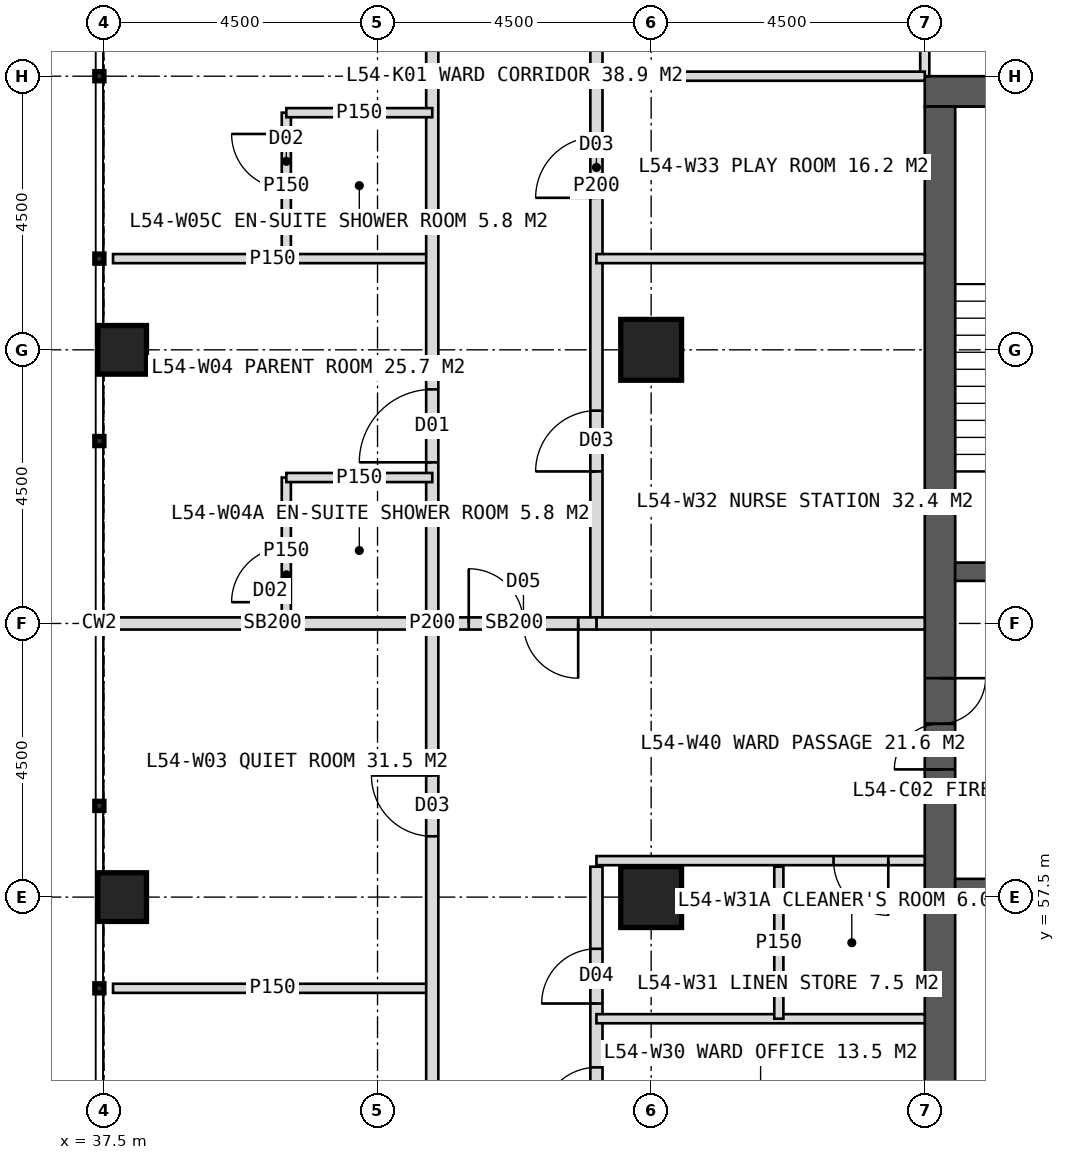
"""IFC4 building model, lengths in metres.
Left out: names, types, materials, properties, quantities, classifications, styles, units other than length and angle.
Written with IfcOpenShell. Run it as: python <this file> out.ifc"""

import sys

from ifc_helpers import new_model, si_unit, direction, frame, frame_2d, origin, origin_2d, place, context, subcontext, project, spatial, rectangle, hollow_rectangle, extrude, element, fill, save


model = new_model("IFC4")
c1 = context("Model", 3, precision=1e-05, world=origin(), true_north=direction((0.0, 1.0)))
c2 = subcontext(c1, "Body", "Model", "MODEL_VIEW")
j1 = project(units=[si_unit("LENGTHUNIT", "METRE"), si_unit("PLANEANGLEUNIT", "RADIAN")], contexts=[c1])
p1 = place(None, origin())
s1 = spatial("IfcSite", under=j1, at=p1, CompositionType="ELEMENT")
p2 = place(p1, origin())
s2 = spatial("IfcBuilding", under=s1, at=p2, CompositionType="ELEMENT")
p3 = place(p2, frame((0.0, 0.0, 225.0)))
s3 = spatial("IfcBuildingStorey", under=s2, at=p3, CompositionType="ELEMENT", Elevation=225.0)
p4 = place(p3, frame((51.0, 70.75, 0.0), z_axis=(0.0, 0.0, 1.0), x_axis=(1.0, 0.0, 0.0)))
e1 = element("IfcWall", 1, at=p4, inside=s3, PredefinedType="SHEAR", context=c2, shape_type="SweptSolid", body=[
    extrude(rectangle(XDim=18.0, YDim=0.5, at=frame_2d((9.0, 0.0))), origin(), (0.0, 0.0, 1.0), 4.0),
])
p5 = place(p4, frame((8.1, 0.0, 0.0)))
e2 = element("IfcOpeningElement", 2, at=p5, cuts=e1, PredefinedType="OPENING", context=c2, shape_type="SweptSolid", body=[
    extrude(rectangle(XDim=1.8, YDim=2.2, at=frame_2d((0.9, 1.1))), frame((0.0, 0.26, 0.0), z_axis=(0.0, -1.0, 0.0), x_axis=(1.0, 0.0, 0.0)), (0.0, 0.0, 1.0), 0.52),
])
p6 = place(p3, frame((51.25, 53.5, 0.0), z_axis=(0.0, 0.0, 1.0), x_axis=(0.0, 1.0, 0.0)))
e3 = element("IfcWall", 3, at=p6, inside=s3, PredefinedType="SHEAR", context=c2, shape_type="SweptSolid", body=[
    extrude(rectangle(XDim=17.0, YDim=0.5, at=frame_2d((8.5, 0.0))), origin(), (0.0, 0.0, 1.0), 4.0),
])
p7 = place(p6, frame((6.1, 0.0, 0.0)))
e4 = element("IfcOpeningElement", 4, at=p7, cuts=e3, PredefinedType="OPENING", context=c2, shape_type="SweptSolid", body=[
    extrude(rectangle(XDim=1.5, YDim=2.2, at=frame_2d((0.75, 1.1))), frame((0.0, 0.26, 0.0), z_axis=(0.0, -1.0, 0.0), x_axis=(1.0, 0.0, 0.0)), (0.0, 0.0, 1.0), 0.52),
])
p8 = place(p3, frame((51.5, 62.85, 0.0), z_axis=(0.0, 0.0, 1.0), x_axis=(1.0, 0.0, 0.0)))
e5 = element("IfcWall", 5, at=p8, inside=s3, PredefinedType="SHEAR", context=c2, shape_type="SweptSolid", body=[
    extrude(rectangle(XDim=3.3, YDim=0.3, at=frame_2d((1.65, 0.0))), origin(), (0.0, 0.0, 1.0), 4.0),
])
p9 = place(p8, frame((1.15, 0.0, 0.0)))
e6 = element("IfcOpeningElement", 6, at=p9, cuts=e5, PredefinedType="OPENING", context=c2, shape_type="SweptSolid", body=[
    extrude(rectangle(XDim=1.2, YDim=2.1, at=frame_2d((0.6, 1.05))), frame((0.0, 0.16, 0.0), z_axis=(0.0, -1.0, 0.0), x_axis=(1.0, 0.0, 0.0)), (0.0, 0.0, 1.0), 0.32),
])
p10 = place(p3, frame((51.5, 57.65, 0.0), z_axis=(0.0, 0.0, 1.0), x_axis=(1.0, 0.0, 0.0)))
e7 = element("IfcWall", 7, at=p10, inside=s3, PredefinedType="SHEAR", context=c2, shape_type="SweptSolid", body=[
    extrude(rectangle(XDim=3.3, YDim=0.3, at=frame_2d((1.65, 0.0))), origin(), (0.0, 0.0, 1.0), 4.0),
])
p11 = place(p10, frame((1.15, 0.0, 0.0)))
e8 = element("IfcOpeningElement", 8, at=p11, cuts=e7, PredefinedType="OPENING", context=c2, shape_type="SweptSolid", body=[
    extrude(rectangle(XDim=1.2, YDim=2.2, at=frame_2d((0.6, 1.1))), frame((0.0, 0.16, 0.0), z_axis=(0.0, -1.0, 0.0), x_axis=(1.0, 0.0, 0.0)), (0.0, 0.0, 1.0), 0.32),
])
for number, where, z_axis, x_axis in (
    (9, (46.5, 57.5, 0.0), (0.0, 0.0, 1.0), (1.0, 0.0, 0.0)),
    (10, (46.5, 66.5, 0.0), (0.0, 0.0, 1.0), (1.0, 0.0, 0.0)),
):
    element("IfcColumn", number, at=place(p3, frame(where, z_axis=z_axis, x_axis=x_axis)), inside=s3, PredefinedType="COLUMN", context=c2, shape_type="SweptSolid", body=[
        extrude(hollow_rectangle(XDim=1.0, YDim=1.0, WallThickness=0.1, at=origin_2d()), origin(), (0.0, 0.0, 1.0), 4.0),
    ])
for number, where, z_axis, x_axis in (
    (11, (37.8, 57.5, 0.0), (0.0, 0.0, 1.0), (1.0, 0.0, 0.0)),
    (12, (37.8, 66.5, 0.0), (0.0, 0.0, 1.0), (1.0, 0.0, 0.0)),
):
    element("IfcColumn", number, at=place(p3, frame(where, z_axis=z_axis, x_axis=x_axis)), inside=s3, PredefinedType="COLUMN", context=c2, shape_type="SweptSolid", body=[
        extrude(hollow_rectangle(XDim=0.8, YDim=0.8, WallThickness=0.08, at=origin_2d()), origin(), (0.0, 0.0, 1.0), 4.0),
    ])
p12 = place(p3, frame((51.0, 71.0, 0.0), z_axis=(0.0, 0.0, 1.0), x_axis=(0.0, 1.0, 0.0)))
e13 = element("IfcWall", 13, at=p12, inside=s3, PredefinedType="PARTITIONING", context=c2, shape_type="SweptSolid", body=[
    extrude(rectangle(XDim=5.4, YDim=0.15, at=frame_2d((2.7, 0.0))), origin(), (0.0, 0.0, 1.0), 3.75),
])
p13 = place(p3, frame((42.9, 56.0, 0.0), z_axis=(0.0, 0.0, 1.0), x_axis=(-1.0, 0.0, 0.0)))
e14 = element("IfcWall", 14, at=p13, inside=s3, PredefinedType="PARTITIONING", context=c2, shape_type="SweptSolid", body=[
    extrude(rectangle(XDim=5.25, YDim=0.15, at=frame_2d((2.625, 0.0))), origin(), (0.0, 0.0, 1.0), 3.75),
])
p14 = place(p3, frame((42.9, 62.0, 0.0), z_axis=(0.0, 0.0, 1.0), x_axis=(-1.0, 0.0, 0.0)))
e15 = element("IfcWall", 15, at=p14, inside=s3, PredefinedType="SOLIDWALL", context=c2, shape_type="SweptSolid", body=[
    extrude(rectangle(XDim=5.25, YDim=0.2, at=frame_2d((2.625, 0.0))), origin(), (0.0, 0.0, 1.0), 2.95),
])
p15 = place(p3, frame((42.9, 68.0, 0.0), z_axis=(0.0, 0.0, 1.0), x_axis=(-1.0, 0.0, 0.0)))
e16 = element("IfcWall", 16, at=p15, inside=s3, PredefinedType="PARTITIONING", context=c2, shape_type="SweptSolid", body=[
    extrude(rectangle(XDim=5.25, YDim=0.15, at=frame_2d((2.625, 0.0))), origin(), (0.0, 0.0, 1.0), 3.75),
])
p16 = place(p3, frame((42.9, 44.9, 0.0), z_axis=(0.0, 0.0, 1.0), x_axis=(0.0, 1.0, 0.0)))
e17 = element("IfcWall", 17, at=p16, inside=s3, PredefinedType="PARTITIONING", context=c2, shape_type="SweptSolid", body=[
    extrude(rectangle(XDim=34.2, YDim=0.2, at=frame_2d((17.1, 0.0))), origin(), (0.0, 0.0, 1.0), 3.75),
])
p17 = place(p16, frame((1.25, 0.0, 0.0)))
e18 = element("IfcOpeningElement", 18, at=p17, cuts=e17, PredefinedType="OPENING", context=c2, shape_type="SweptSolid", body=[
    extrude(rectangle(XDim=1.2, YDim=2.2, at=frame_2d((0.6, 1.1))), frame((0.0, 0.11, 0.0), z_axis=(0.0, -1.0, 0.0), x_axis=(1.0, 0.0, 0.0)), (0.0, 0.0, 1.0), 0.22),
])
p18 = place(p16, frame((7.75, 0.0, 0.0)))
e19 = element("IfcOpeningElement", 19, at=p18, cuts=e17, PredefinedType="OPENING", context=c2, shape_type="SweptSolid", body=[
    extrude(rectangle(XDim=1.2, YDim=2.2, at=frame_2d((0.6, 1.1))), frame((0.0, 0.11, 0.0), z_axis=(0.0, -1.0, 0.0), x_axis=(1.0, 0.0, 0.0)), (0.0, 0.0, 1.0), 0.22),
])
p19 = place(p16, frame((13.6, 0.0, 0.0)))
e20 = element("IfcOpeningElement", 20, at=p19, cuts=e17, PredefinedType="OPENING", context=c2, shape_type="SweptSolid", body=[
    extrude(rectangle(XDim=1.0, YDim=2.1, at=frame_2d((0.5, 1.05))), frame((0.0, 0.11, 0.0), z_axis=(0.0, -1.0, 0.0), x_axis=(1.0, 0.0, 0.0)), (0.0, 0.0, 1.0), 0.22),
])
p20 = place(p16, frame((19.75, 0.0, 0.0)))
e21 = element("IfcOpeningElement", 21, at=p20, cuts=e17, PredefinedType="OPENING", context=c2, shape_type="SweptSolid", body=[
    extrude(rectangle(XDim=1.2, YDim=2.2, at=frame_2d((0.6, 1.1))), frame((0.0, 0.11, 0.0), z_axis=(0.0, -1.0, 0.0), x_axis=(1.0, 0.0, 0.0)), (0.0, 0.0, 1.0), 0.22),
])
p21 = place(p16, frame((30.35, 0.0, 0.0)))
e22 = element("IfcOpeningElement", 22, at=p21, cuts=e17, PredefinedType="OPENING", context=c2, shape_type="SweptSolid", body=[
    extrude(rectangle(XDim=1.2, YDim=2.2, at=frame_2d((0.6, 1.1))), frame((0.0, 0.11, 0.0), z_axis=(0.0, -1.0, 0.0), x_axis=(1.0, 0.0, 0.0)), (0.0, 0.0, 1.0), 0.22),
])
p22 = place(p3, frame((40.5, 62.0, 0.0), z_axis=(0.0, 0.0, 1.0), x_axis=(0.0, 1.0, 0.0)))
e23 = element("IfcWall", 23, at=p22, inside=s3, PredefinedType="PARTITIONING", context=c2, shape_type="SweptSolid", body=[
    extrude(rectangle(XDim=2.4, YDim=0.15, at=frame_2d((1.2, 0.0))), origin(), (0.0, 0.0, 1.0), 3.75),
])
p23 = place(p22, frame((0.35, 0.0, 0.0)))
e24 = element("IfcOpeningElement", 24, at=p23, cuts=e23, PredefinedType="OPENING", context=c2, shape_type="SweptSolid", body=[
    extrude(rectangle(XDim=0.9, YDim=2.1, at=frame_2d((0.45, 1.05))), frame((0.0, 0.085, 0.0), z_axis=(0.0, -1.0, 0.0), x_axis=(1.0, 0.0, 0.0)), (0.0, 0.0, 1.0), 0.17),
])
p24 = place(p3, frame((42.9, 64.4, 0.0), z_axis=(0.0, 0.0, 1.0), x_axis=(-1.0, 0.0, 0.0)))
e25 = element("IfcWall", 25, at=p24, inside=s3, PredefinedType="PARTITIONING", context=c2, shape_type="SweptSolid", body=[
    extrude(rectangle(XDim=2.4, YDim=0.15, at=frame_2d((1.2, 0.0))), origin(), (0.0, 0.0, 1.0), 3.75),
])
p25 = place(p3, frame((40.5, 68.0, 0.0), z_axis=(0.0, 0.0, 1.0), x_axis=(0.0, 1.0, 0.0)))
e26 = element("IfcWall", 26, at=p25, inside=s3, PredefinedType="PARTITIONING", context=c2, shape_type="SweptSolid", body=[
    extrude(rectangle(XDim=2.4, YDim=0.15, at=frame_2d((1.2, 0.0))), origin(), (0.0, 0.0, 1.0), 3.75),
])
p26 = place(p25, frame((1.15, 0.0, 0.0)))
e27 = element("IfcOpeningElement", 27, at=p26, cuts=e26, PredefinedType="OPENING", context=c2, shape_type="SweptSolid", body=[
    extrude(rectangle(XDim=0.9, YDim=2.1, at=frame_2d((0.45, 1.05))), frame((0.0, 0.085, 0.0), z_axis=(0.0, -1.0, 0.0), x_axis=(1.0, 0.0, 0.0)), (0.0, 0.0, 1.0), 0.17),
])
p27 = place(p3, frame((42.9, 70.4, 0.0), z_axis=(0.0, 0.0, 1.0), x_axis=(-1.0, 0.0, 0.0)))
e28 = element("IfcWall", 28, at=p27, inside=s3, PredefinedType="PARTITIONING", context=c2, shape_type="SweptSolid", body=[
    extrude(rectangle(XDim=2.4, YDim=0.15, at=frame_2d((1.2, 0.0))), origin(), (0.0, 0.0, 1.0), 3.75),
])
p28 = place(p3, frame((45.6, 49.1, 0.0), z_axis=(0.0, 0.0, 1.0), x_axis=(0.0, 1.0, 0.0)))
e29 = element("IfcWall", 29, at=p28, inside=s3, PredefinedType="PARTITIONING", context=c2, shape_type="SweptSolid", body=[
    extrude(rectangle(XDim=8.9, YDim=0.2, at=frame_2d((4.45, 0.0))), origin(), (0.0, 0.0, 1.0), 3.75),
])
p29 = place(p28, frame((4.7, 0.0, 0.0)))
e30 = element("IfcOpeningElement", 30, at=p29, cuts=e29, PredefinedType="OPENING", context=c2, shape_type="SweptSolid", body=[
    extrude(rectangle(XDim=0.9, YDim=2.1, at=frame_2d((0.45, 1.05))), frame((0.0, 0.11, 0.0), z_axis=(0.0, -1.0, 0.0), x_axis=(1.0, 0.0, 0.0)), (0.0, 0.0, 1.0), 0.22),
])
p30 = place(p28, frame((6.65, 0.0, 0.0)))
e31 = element("IfcOpeningElement", 31, at=p30, cuts=e29, PredefinedType="OPENING", context=c2, shape_type="SweptSolid", body=[
    extrude(rectangle(XDim=0.9, YDim=2.1, at=frame_2d((0.45, 1.05))), frame((0.0, 0.11, 0.0), z_axis=(0.0, -1.0, 0.0), x_axis=(1.0, 0.0, 0.0)), (0.0, 0.0, 1.0), 0.22),
])
p31 = place(p3, frame((45.6, 62.0, 0.0), z_axis=(0.0, 0.0, 1.0), x_axis=(0.0, 1.0, 0.0)))
e32 = element("IfcWall", 32, at=p31, inside=s3, PredefinedType="PARTITIONING", context=c2, shape_type="SweptSolid", body=[
    extrude(rectangle(XDim=14.4, YDim=0.2, at=frame_2d((7.2, 0.0))), origin(), (0.0, 0.0, 1.0), 3.75),
])
p32 = place(p31, frame((2.5, 0.0, 0.0)))
e33 = element("IfcOpeningElement", 33, at=p32, cuts=e32, PredefinedType="OPENING", context=c2, shape_type="SweptSolid", body=[
    extrude(rectangle(XDim=1.0, YDim=2.1, at=frame_2d((0.5, 1.05))), frame((0.0, 0.11, 0.0), z_axis=(0.0, -1.0, 0.0), x_axis=(1.0, 0.0, 0.0)), (0.0, 0.0, 1.0), 0.22),
])
p33 = place(p31, frame((7.0, 0.0, 0.0)))
e34 = element("IfcOpeningElement", 34, at=p33, cuts=e32, PredefinedType="OPENING", context=c2, shape_type="SweptSolid", body=[
    extrude(rectangle(XDim=1.0, YDim=2.1, at=frame_2d((0.5, 1.05))), frame((0.0, 0.11, 0.0), z_axis=(0.0, -1.0, 0.0), x_axis=(1.0, 0.0, 0.0)), (0.0, 0.0, 1.0), 0.22),
])
p34 = place(p31, frame((11.2, 0.0, 0.0)))
e35 = element("IfcOpeningElement", 35, at=p34, cuts=e32, PredefinedType="OPENING", context=c2, shape_type="SweptSolid", body=[
    extrude(rectangle(XDim=1.0, YDim=2.1, at=frame_2d((0.5, 1.05))), frame((0.0, 0.11, 0.0), z_axis=(0.0, -1.0, 0.0), x_axis=(1.0, 0.0, 0.0)), (0.0, 0.0, 1.0), 0.22),
])
p35 = place(p3, frame((51.0, 58.1, 0.0), z_axis=(0.0, 0.0, 1.0), x_axis=(-1.0, 0.0, 0.0)))
e36 = element("IfcWall", 36, at=p35, inside=s3, PredefinedType="PARTITIONING", context=c2, shape_type="SweptSolid", body=[
    extrude(rectangle(XDim=5.4, YDim=0.15, at=frame_2d((2.7, 0.0))), origin(), (0.0, 0.0, 1.0), 3.75),
])
p36 = place(p35, frame((0.6, 0.0, 0.0)))
e37 = element("IfcOpeningElement", 37, at=p36, cuts=e36, PredefinedType="OPENING", context=c2, shape_type="SweptSolid", body=[
    extrude(rectangle(XDim=0.9, YDim=2.1, at=frame_2d((0.45, 1.05))), frame((0.0, 0.085, 0.0), z_axis=(0.0, -1.0, 0.0), x_axis=(1.0, 0.0, 0.0)), (0.0, 0.0, 1.0), 0.17),
])
p37 = place(p3, frame((51.0, 62.0, 0.0), z_axis=(0.0, 0.0, 1.0), x_axis=(-1.0, 0.0, 0.0)))
e38 = element("IfcWall", 38, at=p37, inside=s3, PredefinedType="SOLIDWALL", context=c2, shape_type="SweptSolid", body=[
    extrude(rectangle(XDim=5.4, YDim=0.2, at=frame_2d((2.7, 0.0))), origin(), (0.0, 0.0, 1.0), 2.95),
])
for number, where, z_axis, x_axis in (
    (39, (51.0, 55.5, 0.0), (0.0, 0.0, 1.0), (-1.0, 0.0, 0.0)),
    (40, (51.0, 68.0, 0.0), (0.0, 0.0, 1.0), (-1.0, 0.0, 0.0)),
    (41, (51.0, 71.0, 0.0), (0.0, 0.0, 1.0), (-1.0, 0.0, 0.0)),
):
    element("IfcWall", number, at=place(p3, frame(where, z_axis=z_axis, x_axis=x_axis)), inside=s3, PredefinedType="PARTITIONING", context=c2, shape_type="SweptSolid", body=[
        extrude(rectangle(XDim=5.4, YDim=0.15, at=frame_2d((2.7, 0.0))), origin(), (0.0, 0.0, 1.0), 3.75),
    ])
p38 = place(p3, frame((48.6, 55.5, 0.0), z_axis=(0.0, 0.0, 1.0), x_axis=(0.0, 1.0, 0.0)))
e42 = element("IfcWall", 42, at=p38, inside=s3, PredefinedType="PARTITIONING", context=c2, shape_type="SweptSolid", body=[
    extrude(rectangle(XDim=2.5, YDim=0.15, at=frame_2d((1.25, 0.0))), origin(), (0.0, 0.0, 1.0), 3.75),
])
p39 = place(p3, frame((45.6, 62.0, 0.0), z_axis=(0.0, 0.0, 1.0), x_axis=(-1.0, 0.0, 0.0)))
e43 = element("IfcWall", 43, at=p39, inside=s3, PredefinedType="SOLIDWALL", context=c2, shape_type="SweptSolid", body=[
    extrude(rectangle(XDim=2.7, YDim=0.2, at=frame_2d((1.35, 0.0))), origin(), (0.0, 0.0, 1.0), 2.95),
])
p40 = place(p39, frame((0.3, 0.0, 0.0)))
e44 = element("IfcOpeningElement", 44, at=p40, cuts=e43, PredefinedType="OPENING", context=c2, shape_type="SweptSolid", body=[
    extrude(rectangle(XDim=1.8, YDim=2.2, at=frame_2d((0.9, 1.1))), frame((0.0, 0.11, 0.0), z_axis=(0.0, -1.0, 0.0), x_axis=(1.0, 0.0, 0.0)), (0.0, 0.0, 1.0), 0.22),
])
p41 = place(p19, origin())
e45 = element("IfcDoor", 45, at=p41, inside=s3, OperationType="SINGLE_SWING_RIGHT", PredefinedType="DOOR", context=c2, shape_type="SweptSolid", body=[
    extrude(rectangle(XDim=1.0, YDim=2.1, at=frame_2d((0.5, 1.05))), frame((0.0, 0.025, 0.0), z_axis=(0.0, -1.0, 0.0), x_axis=(1.0, 0.0, 0.0)), (0.0, 0.0, 1.0), 0.05),
])
fill(e20, e45)
p42 = place(p20, origin())
e46 = element("IfcDoor", 46, at=p42, inside=s3, OperationType="SINGLE_SWING_LEFT", PredefinedType="DOOR", context=c2, shape_type="SweptSolid", body=[
    extrude(rectangle(XDim=1.2, YDim=2.2, at=frame_2d((0.6, 1.1))), frame((0.0, 0.025, 0.0), z_axis=(0.0, -1.0, 0.0), x_axis=(1.0, 0.0, 0.0)), (0.0, 0.0, 1.0), 0.05),
])
fill(e21, e46)
p43 = place(p23, origin())
e47 = element("IfcDoor", 47, at=p43, inside=s3, OperationType="SINGLE_SWING_LEFT", PredefinedType="DOOR", context=c2, shape_type="SweptSolid", body=[
    extrude(rectangle(XDim=0.9, YDim=2.1, at=frame_2d((0.45, 1.05))), frame((0.0, 0.025, 0.0), z_axis=(0.0, -1.0, 0.0), x_axis=(1.0, 0.0, 0.0)), (0.0, 0.0, 1.0), 0.05),
])
fill(e24, e47)
p44 = place(p26, origin())
e48 = element("IfcDoor", 48, at=p44, inside=s3, OperationType="SINGLE_SWING_RIGHT", PredefinedType="DOOR", context=c2, shape_type="SweptSolid", body=[
    extrude(rectangle(XDim=0.9, YDim=2.1, at=frame_2d((0.45, 1.05))), frame((0.0, 0.025, 0.0), z_axis=(0.0, -1.0, 0.0), x_axis=(1.0, 0.0, 0.0)), (0.0, 0.0, 1.0), 0.05),
])
fill(e27, e48)
p45 = place(p29, origin())
e49 = element("IfcDoor", 49, at=p45, inside=s3, OperationType="SINGLE_SWING_LEFT", PredefinedType="DOOR", context=c2, shape_type="SweptSolid", body=[
    extrude(rectangle(XDim=0.9, YDim=2.1, at=frame_2d((0.45, 1.05))), frame((0.0, 0.025, 0.0), z_axis=(0.0, -1.0, 0.0), x_axis=(1.0, 0.0, 0.0)), (0.0, 0.0, 1.0), 0.05),
])
fill(e30, e49)
p46 = place(p36, origin())
e50 = element("IfcDoor", 50, at=p46, inside=s3, OperationType="SINGLE_SWING_LEFT", PredefinedType="DOOR", context=c2, shape_type="SweptSolid", body=[
    extrude(rectangle(XDim=0.9, YDim=2.1, at=frame_2d((0.45, 1.05))), frame((0.0, 0.025, 0.0), z_axis=(0.0, -1.0, 0.0), x_axis=(1.0, 0.0, 0.0)), (0.0, 0.0, 1.0), 0.05),
])
fill(e37, e50)
p47 = place(p30, origin())
e51 = element("IfcDoor", 51, at=p47, inside=s3, OperationType="SINGLE_SWING_LEFT", PredefinedType="DOOR", context=c2, shape_type="SweptSolid", body=[
    extrude(rectangle(XDim=0.9, YDim=2.1, at=frame_2d((0.45, 1.05))), frame((0.0, 0.025, 0.0), z_axis=(0.0, -1.0, 0.0), x_axis=(1.0, 0.0, 0.0)), (0.0, 0.0, 1.0), 0.05),
])
fill(e31, e51)
p48 = place(p32, origin())
e52 = element("IfcDoor", 52, at=p48, inside=s3, OperationType="SINGLE_SWING_LEFT", PredefinedType="DOOR", context=c2, shape_type="SweptSolid", body=[
    extrude(rectangle(XDim=1.0, YDim=2.1, at=frame_2d((0.5, 1.05))), frame((0.0, 0.025, 0.0), z_axis=(0.0, -1.0, 0.0), x_axis=(1.0, 0.0, 0.0)), (0.0, 0.0, 1.0), 0.05),
])
fill(e33, e52)
p49 = place(p33, origin())
e53 = element("IfcDoor", 53, at=p49, inside=s3, OperationType="SINGLE_SWING_LEFT", PredefinedType="DOOR", context=c2, shape_type="SweptSolid", body=[
    extrude(rectangle(XDim=1.0, YDim=2.1, at=frame_2d((0.5, 1.05))), frame((0.0, 0.025, 0.0), z_axis=(0.0, -1.0, 0.0), x_axis=(1.0, 0.0, 0.0)), (0.0, 0.0, 1.0), 0.05),
])
fill(e34, e53)
p50 = place(p40, origin())
e54 = element("IfcDoor", 54, at=p50, inside=s3, OperationType="DOUBLE_DOOR_DOUBLE_SWING", PredefinedType="DOOR", context=c2, shape_type="SweptSolid", body=[
    extrude(rectangle(XDim=1.8, YDim=2.2, at=frame_2d((0.9, 1.1))), frame((0.0, 0.025, 0.0), z_axis=(0.0, -1.0, 0.0), x_axis=(1.0, 0.0, 0.0)), (0.0, 0.0, 1.0), 0.05),
])
fill(e44, e54)
p51 = place(p7, origin())
e55 = element("IfcDoor", 55, at=p51, inside=s3, OperationType="DOUBLE_DOOR_SINGLE_SWING", PredefinedType="DOOR", context=c2, shape_type="SweptSolid", body=[
    extrude(rectangle(XDim=1.5, YDim=2.2, at=frame_2d((0.75, 1.1))), frame((0.0, 0.025, 0.0), z_axis=(0.0, -1.0, 0.0), x_axis=(1.0, 0.0, 0.0)), (0.0, 0.0, 1.0), 0.05),
])
fill(e4, e55)
save(model, sys.argv[1])
